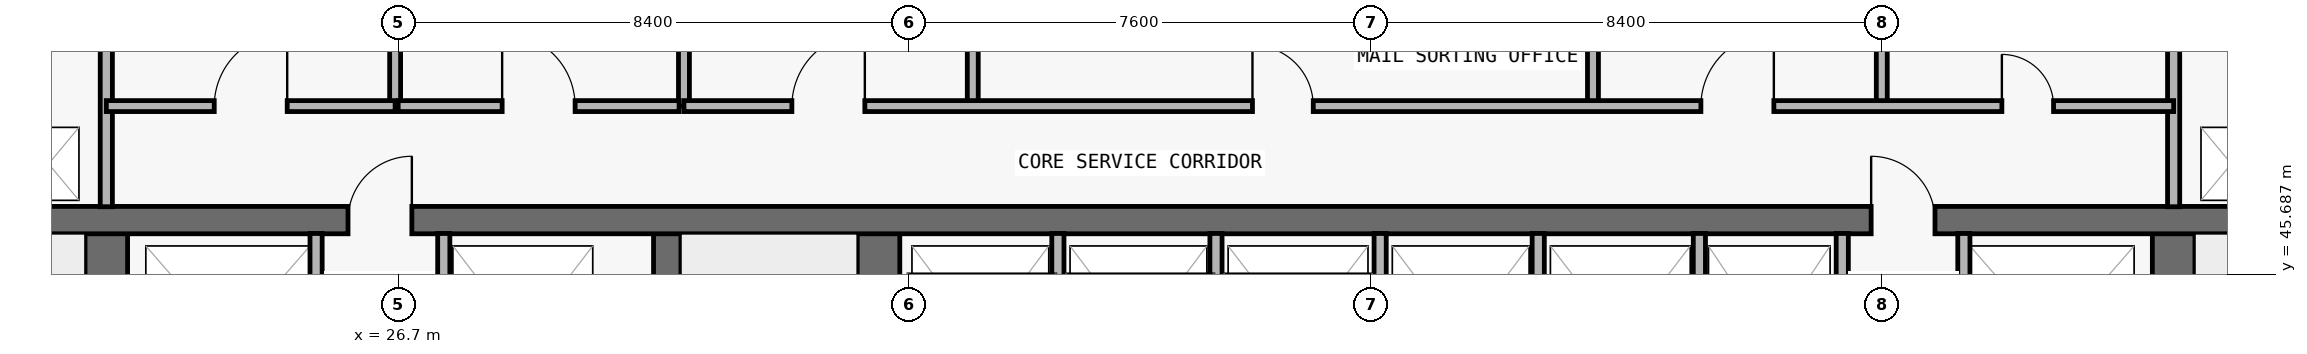
"""IFC4 building model, lengths in metres.
Left out: names, types, materials, properties, quantities, classifications, styles, units other than length and angle.
Written with IfcOpenShell. Run it as: python <this file> out.ifc"""

import sys

from ifc_helpers import new_model, si_unit, direction, frame, frame_2d, origin, place, context, subcontext, project, spatial, rectangle, extrude, element, fill, save


model = new_model("IFC4")
c1 = context("Model", 3, precision=1e-05, world=origin(), true_north=direction((0.0, 1.0)))
c2 = subcontext(c1, "Body", "Model", "MODEL_VIEW")
j1 = project(units=[si_unit("LENGTHUNIT", "METRE"), si_unit("PLANEANGLEUNIT", "RADIAN")], contexts=[c1])
p1 = place(None, origin())
s1 = spatial("IfcSite", under=j1, at=p1, CompositionType="ELEMENT")
p2 = place(p1, origin())
s2 = spatial("IfcBuilding", under=s1, at=p2, CompositionType="ELEMENT")
p3 = place(p2, frame((0.0, 0.0, 43.2)))
s3 = spatial("IfcBuildingStorey", under=s2, at=p3, CompositionType="ELEMENT", Elevation=43.2)
p4 = place(p3, frame((21.9, 36.9, 0.0), z_axis=(0.0, 0.0, 1.0), x_axis=(0.0, 1.0, 0.0)))
e1 = element("IfcWall", 1, at=p4, inside=s3, PredefinedType="SHEAR", context=c2, shape_type="SweptSolid", body=[
    extrude(rectangle(XDim=9.675, YDim=0.7, at=frame_2d((4.837, 0.0))), origin(), (0.0, 0.0, 1.0), 3.05),
])
p5 = place(p4, frame((0.65, 0.0, 0.0)))
e2 = element("IfcOpeningElement", 2, at=p5, cuts=e1, PredefinedType="OPENING", context=c2, shape_type="SweptSolid", body=[
    extrude(rectangle(XDim=1.1, YDim=2.15, at=frame_2d((0.55, 1.075))), frame((0.0, 0.36, 0.0), z_axis=(0.0, -1.0, 0.0), x_axis=(1.0, 0.0, 0.0)), (0.0, 0.0, 1.0), 0.72),
])
p6 = place(p3, frame((55.9, 36.9, 0.0), z_axis=(0.0, 0.0, 1.0), x_axis=(0.0, 1.0, 0.0)))
e3 = element("IfcWall", 3, at=p6, inside=s3, PredefinedType="SHEAR", context=c2, shape_type="SweptSolid", body=[
    extrude(rectangle(XDim=9.675, YDim=0.7, at=frame_2d((4.837, 0.0))), origin(), (0.0, 0.0, 1.0), 3.05),
])
p7 = place(p6, frame((0.65, 0.0, 0.0)))
e4 = element("IfcOpeningElement", 4, at=p7, cuts=e3, PredefinedType="OPENING", context=c2, shape_type="SweptSolid", body=[
    extrude(rectangle(XDim=1.1, YDim=2.15, at=frame_2d((0.55, 1.075))), frame((0.0, 0.36, 0.0), z_axis=(0.0, -1.0, 0.0), x_axis=(1.0, 0.0, 0.0)), (0.0, 0.0, 1.0), 0.72),
])
p8 = place(p3, frame((31.125, 36.9, 0.0), z_axis=(0.0, 0.0, 1.0), x_axis=(0.0, 1.0, 0.0)))
e5 = element("IfcWall", 5, at=p8, inside=s3, PredefinedType="SHEAR", context=c2, shape_type="SweptSolid", body=[
    extrude(rectangle(XDim=9.675, YDim=0.45, at=frame_2d((4.837, 0.0))), origin(), (0.0, 0.0, 1.0), 3.05),
])
p9 = place(p3, frame((34.6, 36.9, 0.0), z_axis=(0.0, 0.0, 1.0), x_axis=(0.0, 1.0, 0.0)))
e6 = element("IfcWall", 6, at=p9, inside=s3, PredefinedType="SHEAR", context=c2, shape_type="SweptSolid", body=[
    extrude(rectangle(XDim=9.675, YDim=0.7, at=frame_2d((4.837, 0.0))), origin(), (0.0, 0.0, 1.0), 3.05),
])
p10 = place(p3, frame((18.2, 46.575, 0.0), z_axis=(0.0, 0.0, 1.0), x_axis=(1.0, 0.0, 0.0)))
e7 = element("IfcWall", 7, at=p10, inside=s3, PredefinedType="SHEAR", context=c2, shape_type="SweptSolid", body=[
    extrude(rectangle(XDim=41.4, YDim=0.45, at=frame_2d((20.7, 0.0))), origin(), (0.0, 0.0, 1.0), 3.05),
])
p11 = place(p10, frame((7.675, 0.0, 0.0)))
e8 = element("IfcOpeningElement", 8, at=p11, cuts=e7, PredefinedType="OPENING", context=c2, shape_type="SweptSolid", body=[
    extrude(rectangle(XDim=1.05, YDim=2.15, at=frame_2d((0.525, 1.075))), frame((0.0, 0.235, 0.0), z_axis=(0.0, -1.0, 0.0), x_axis=(1.0, 0.0, 0.0)), (0.0, 0.0, 1.0), 0.47),
])
p12 = place(p10, frame((32.725, 0.0, 0.0)))
e9 = element("IfcOpeningElement", 9, at=p12, cuts=e7, PredefinedType="OPENING", context=c2, shape_type="SweptSolid", body=[
    extrude(rectangle(XDim=1.05, YDim=2.15, at=frame_2d((0.525, 1.075))), frame((0.0, 0.235, 0.0), z_axis=(0.0, -1.0, 0.0), x_axis=(1.0, 0.0, 0.0)), (0.0, 0.0, 1.0), 0.47),
])
p13 = place(p3, frame((21.9, 46.795, 0.0), z_axis=(0.0, 0.0, 1.0), x_axis=(0.0, 1.0, 0.0)))
e10 = element("IfcWall", 10, at=p13, inside=s3, PredefinedType="PARTITIONING", context=c2, shape_type="SweptSolid", body=[
    extrude(rectangle(XDim=3.06, YDim=0.2, at=frame_2d((1.53, 0.0))), origin(), (0.0, 0.0, 1.0), 3.05),
])
p14 = place(p3, frame((25.35, 43.17, 0.0), z_axis=(0.0, 0.0, 1.0), x_axis=(0.0, 1.0, 0.0)))
e11 = element("IfcWall", 11, at=p14, inside=s3, PredefinedType="PARTITIONING", context=c2, shape_type="SweptSolid", body=[
    extrude(rectangle(XDim=3.185, YDim=0.2, at=frame_2d((1.593, 0.0))), origin(), (0.0, 0.0, 1.0), 3.05),
])
p15 = place(p3, frame((26.65, 48.45, 0.0), z_axis=(0.0, 0.0, 1.0), x_axis=(0.0, 1.0, 0.0)))
e12 = element("IfcWall", 12, at=p15, inside=s3, PredefinedType="PARTITIONING", context=c2, shape_type="SweptSolid", body=[
    extrude(rectangle(XDim=1.405, YDim=0.18, at=frame_2d((0.703, 0.0))), origin(), (0.0, 0.0, 1.0), 3.05),
])
p16 = place(p3, frame((27.45, 43.17, 0.0), z_axis=(0.0, 0.0, 1.0), x_axis=(0.0, 1.0, 0.0)))
e13 = element("IfcWall", 13, at=p16, inside=s3, PredefinedType="PARTITIONING", context=c2, shape_type="SweptSolid", body=[
    extrude(rectangle(XDim=3.185, YDim=0.2, at=frame_2d((1.593, 0.0))), origin(), (0.0, 0.0, 1.0), 3.05),
])
for number, where, z_axis, x_axis in (
    (14, (31.4, 48.45, 0.0), (0.0, 0.0, 1.0), (0.0, 1.0, 0.0)),
    (15, (36.15, 48.45, 0.0), (0.0, 0.0, 1.0), (0.0, 1.0, 0.0)),
):
    element("IfcWall", number, at=place(p3, frame(where, z_axis=z_axis, x_axis=x_axis)), inside=s3, PredefinedType="PARTITIONING", context=c2, shape_type="SweptSolid", body=[
        extrude(rectangle(XDim=1.405, YDim=0.18, at=frame_2d((0.703, 0.0))), origin(), (0.0, 0.0, 1.0), 3.05),
    ])
for number, where, z_axis, x_axis in (
    (16, (37.55, 43.17, 0.0), (0.0, 0.0, 1.0), (0.0, 1.0, 0.0)),
    (17, (40.15, 43.17, 0.0), (0.0, 0.0, 1.0), (0.0, 1.0, 0.0)),
    (18, (42.85, 43.17, 0.0), (0.0, 0.0, 1.0), (0.0, 1.0, 0.0)),
    (19, (45.45, 43.17, 0.0), (0.0, 0.0, 1.0), (0.0, 1.0, 0.0)),
):
    element("IfcWall", number, at=place(p3, frame(where, z_axis=z_axis, x_axis=x_axis)), inside=s3, PredefinedType="PARTITIONING", context=c2, shape_type="SweptSolid", body=[
        extrude(rectangle(XDim=3.185, YDim=0.2, at=frame_2d((1.593, 0.0))), origin(), (0.0, 0.0, 1.0), 3.05),
    ])
p17 = place(p3, frame((46.35, 48.45, 0.0), z_axis=(0.0, 0.0, 1.0), x_axis=(0.0, 1.0, 0.0)))
e20 = element("IfcWall", 20, at=p17, inside=s3, PredefinedType="PARTITIONING", context=c2, shape_type="SweptSolid", body=[
    extrude(rectangle(XDim=1.405, YDim=0.18, at=frame_2d((0.703, 0.0))), origin(), (0.0, 0.0, 1.0), 3.05),
])
for number, where, z_axis, x_axis in (
    (21, (48.1, 43.17, 0.0), (0.0, 0.0, 1.0), (0.0, 1.0, 0.0)),
    (22, (50.45, 43.17, 0.0), (0.0, 0.0, 1.0), (0.0, 1.0, 0.0)),
):
    element("IfcWall", number, at=place(p3, frame(where, z_axis=z_axis, x_axis=x_axis)), inside=s3, PredefinedType="PARTITIONING", context=c2, shape_type="SweptSolid", body=[
        extrude(rectangle(XDim=3.185, YDim=0.2, at=frame_2d((1.593, 0.0))), origin(), (0.0, 0.0, 1.0), 3.05),
    ])
p18 = place(p3, frame((51.1, 48.45, 0.0), z_axis=(0.0, 0.0, 1.0), x_axis=(0.0, 1.0, 0.0)))
e23 = element("IfcWall", 23, at=p18, inside=s3, PredefinedType="PARTITIONING", context=c2, shape_type="SweptSolid", body=[
    extrude(rectangle(XDim=1.405, YDim=0.18, at=frame_2d((0.703, 0.0))), origin(), (0.0, 0.0, 1.0), 3.05),
])
p19 = place(p3, frame((52.45, 43.17, 0.0), z_axis=(0.0, 0.0, 1.0), x_axis=(0.0, 1.0, 0.0)))
e24 = element("IfcWall", 24, at=p19, inside=s3, PredefinedType="PARTITIONING", context=c2, shape_type="SweptSolid", body=[
    extrude(rectangle(XDim=3.185, YDim=0.2, at=frame_2d((1.593, 0.0))), origin(), (0.0, 0.0, 1.0), 3.05),
])
p20 = place(p3, frame((55.9, 46.795, 0.0), z_axis=(0.0, 0.0, 1.0), x_axis=(0.0, 1.0, 0.0)))
e25 = element("IfcWall", 25, at=p20, inside=s3, PredefinedType="PARTITIONING", context=c2, shape_type="SweptSolid", body=[
    extrude(rectangle(XDim=3.06, YDim=0.2, at=frame_2d((1.53, 0.0))), origin(), (0.0, 0.0, 1.0), 3.05),
])
p21 = place(p3, frame((21.9, 48.45, 0.0), z_axis=(0.0, 0.0, 1.0), x_axis=(1.0, 0.0, 0.0)))
e26 = element("IfcWall", 26, at=p21, inside=s3, PredefinedType="PARTITIONING", context=c2, shape_type="SweptSolid", body=[
    extrude(rectangle(XDim=4.75, YDim=0.18, at=frame_2d((2.375, 0.0))), origin(), (0.0, 0.0, 1.0), 3.05),
])
p22 = place(p21, frame((1.775, 0.0, 0.0)))
e27 = element("IfcOpeningElement", 27, at=p22, cuts=e26, PredefinedType="OPENING", context=c2, shape_type="SweptSolid", body=[
    extrude(rectangle(XDim=1.2, YDim=2.2, at=frame_2d((0.6, 1.1))), frame((0.0, 0.1, 0.0), z_axis=(0.0, -1.0, 0.0), x_axis=(1.0, 0.0, 0.0)), (0.0, 0.0, 1.0), 0.2),
])
p23 = place(p3, frame((26.7, 48.45, 0.0), z_axis=(0.0, 0.0, 1.0), x_axis=(1.0, 0.0, 0.0)))
e28 = element("IfcWall", 28, at=p23, inside=s3, PredefinedType="PARTITIONING", context=c2, shape_type="SweptSolid", body=[
    extrude(rectangle(XDim=4.62, YDim=0.18, at=frame_2d((2.31, 0.0))), origin(), (0.0, 0.0, 1.0), 3.05),
])
p24 = place(p23, frame((1.71, 0.0, 0.0)))
e29 = element("IfcOpeningElement", 29, at=p24, cuts=e28, PredefinedType="OPENING", context=c2, shape_type="SweptSolid", body=[
    extrude(rectangle(XDim=1.2, YDim=2.2, at=frame_2d((0.6, 1.1))), frame((0.0, 0.1, 0.0), z_axis=(0.0, -1.0, 0.0), x_axis=(1.0, 0.0, 0.0)), (0.0, 0.0, 1.0), 0.2),
])
p25 = place(p3, frame((31.4, 48.45, 0.0), z_axis=(0.0, 0.0, 1.0), x_axis=(1.0, 0.0, 0.0)))
e30 = element("IfcWall", 30, at=p25, inside=s3, PredefinedType="PARTITIONING", context=c2, shape_type="SweptSolid", body=[
    extrude(rectangle(XDim=24.5, YDim=0.18, at=frame_2d((12.25, 0.0))), origin(), (0.0, 0.0, 1.0), 3.05),
])
p26 = place(p25, frame((1.775, 0.0, 0.0)))
e31 = element("IfcOpeningElement", 31, at=p26, cuts=e30, PredefinedType="OPENING", context=c2, shape_type="SweptSolid", body=[
    extrude(rectangle(XDim=1.2, YDim=2.2, at=frame_2d((0.6, 1.1))), frame((0.0, 0.1, 0.0), z_axis=(0.0, -1.0, 0.0), x_axis=(1.0, 0.0, 0.0)), (0.0, 0.0, 1.0), 0.2),
])
p27 = place(p25, frame((9.35, 0.0, 0.0)))
e32 = element("IfcOpeningElement", 32, at=p27, cuts=e30, PredefinedType="OPENING", context=c2, shape_type="SweptSolid", body=[
    extrude(rectangle(XDim=1.0, YDim=2.2, at=frame_2d((0.5, 1.1))), frame((0.0, 0.1, 0.0), z_axis=(0.0, -1.0, 0.0), x_axis=(1.0, 0.0, 0.0)), (0.0, 0.0, 1.0), 0.2),
])
p28 = place(p25, frame((16.725, 0.0, 0.0)))
e33 = element("IfcOpeningElement", 33, at=p28, cuts=e30, PredefinedType="OPENING", context=c2, shape_type="SweptSolid", body=[
    extrude(rectangle(XDim=1.2, YDim=2.2, at=frame_2d((0.6, 1.1))), frame((0.0, 0.1, 0.0), z_axis=(0.0, -1.0, 0.0), x_axis=(1.0, 0.0, 0.0)), (0.0, 0.0, 1.0), 0.2),
])
p29 = place(p25, frame((21.675, 0.0, 0.0)))
e34 = element("IfcOpeningElement", 34, at=p29, cuts=e30, PredefinedType="OPENING", context=c2, shape_type="SweptSolid", body=[
    extrude(rectangle(XDim=0.85, YDim=2.1, at=frame_2d((0.425, 1.05))), frame((0.0, 0.1, 0.0), z_axis=(0.0, -1.0, 0.0), x_axis=(1.0, 0.0, 0.0)), (0.0, 0.0, 1.0), 0.2),
])
p30 = place(p11, origin())
e35 = element("IfcDoor", 35, at=p30, inside=s3, OperationType="SINGLE_SWING_RIGHT", PredefinedType="DOOR", context=c2, shape_type="SweptSolid", body=[
    extrude(rectangle(XDim=1.05, YDim=2.15, at=frame_2d((0.525, 1.075))), frame((0.0, 0.025, 0.0), z_axis=(0.0, -1.0, 0.0), x_axis=(1.0, 0.0, 0.0)), (0.0, 0.0, 1.0), 0.05),
])
fill(e8, e35)
p31 = place(p12, origin())
e36 = element("IfcDoor", 36, at=p31, inside=s3, OperationType="SINGLE_SWING_LEFT", PredefinedType="DOOR", context=c2, shape_type="SweptSolid", body=[
    extrude(rectangle(XDim=1.05, YDim=2.15, at=frame_2d((0.525, 1.075))), frame((0.0, 0.025, 0.0), z_axis=(0.0, -1.0, 0.0), x_axis=(1.0, 0.0, 0.0)), (0.0, 0.0, 1.0), 0.05),
])
fill(e9, e36)
p32 = place(p22, origin())
e37 = element("IfcDoor", 37, at=p32, inside=s3, OperationType="SINGLE_SWING_RIGHT", PredefinedType="DOOR", context=c2, shape_type="SweptSolid", body=[
    extrude(rectangle(XDim=1.2, YDim=2.2, at=frame_2d((0.6, 1.1))), frame((0.0, 0.025, 0.0), z_axis=(0.0, -1.0, 0.0), x_axis=(1.0, 0.0, 0.0)), (0.0, 0.0, 1.0), 0.05),
])
fill(e27, e37)
p33 = place(p24, origin())
e38 = element("IfcDoor", 38, at=p33, inside=s3, OperationType="SINGLE_SWING_LEFT", PredefinedType="DOOR", context=c2, shape_type="SweptSolid", body=[
    extrude(rectangle(XDim=1.2, YDim=2.2, at=frame_2d((0.6, 1.1))), frame((0.0, 0.025, 0.0), z_axis=(0.0, -1.0, 0.0), x_axis=(1.0, 0.0, 0.0)), (0.0, 0.0, 1.0), 0.05),
])
fill(e29, e38)
p34 = place(p26, origin())
e39 = element("IfcDoor", 39, at=p34, inside=s3, OperationType="SINGLE_SWING_RIGHT", PredefinedType="DOOR", context=c2, shape_type="SweptSolid", body=[
    extrude(rectangle(XDim=1.2, YDim=2.2, at=frame_2d((0.6, 1.1))), frame((0.0, 0.025, 0.0), z_axis=(0.0, -1.0, 0.0), x_axis=(1.0, 0.0, 0.0)), (0.0, 0.0, 1.0), 0.05),
])
fill(e31, e39)
p35 = place(p27, origin())
e40 = element("IfcDoor", 40, at=p35, inside=s3, OperationType="SINGLE_SWING_LEFT", PredefinedType="DOOR", context=c2, shape_type="SweptSolid", body=[
    extrude(rectangle(XDim=1.0, YDim=2.2, at=frame_2d((0.5, 1.1))), frame((0.0, 0.025, 0.0), z_axis=(0.0, -1.0, 0.0), x_axis=(1.0, 0.0, 0.0)), (0.0, 0.0, 1.0), 0.05),
])
fill(e32, e40)
p36 = place(p28, origin())
e41 = element("IfcDoor", 41, at=p36, inside=s3, OperationType="SINGLE_SWING_RIGHT", PredefinedType="DOOR", context=c2, shape_type="SweptSolid", body=[
    extrude(rectangle(XDim=1.2, YDim=2.2, at=frame_2d((0.6, 1.1))), frame((0.0, 0.025, 0.0), z_axis=(0.0, -1.0, 0.0), x_axis=(1.0, 0.0, 0.0)), (0.0, 0.0, 1.0), 0.05),
])
fill(e33, e41)
p37 = place(p29, origin())
e42 = element("IfcDoor", 42, at=p37, inside=s3, OperationType="SINGLE_SWING_LEFT", PredefinedType="DOOR", context=c2, shape_type="SweptSolid", body=[
    extrude(rectangle(XDim=0.85, YDim=2.1, at=frame_2d((0.425, 1.05))), frame((0.0, 0.025, 0.0), z_axis=(0.0, -1.0, 0.0), x_axis=(1.0, 0.0, 0.0)), (0.0, 0.0, 1.0), 0.05),
])
fill(e34, e42)
save(model, sys.argv[1])
